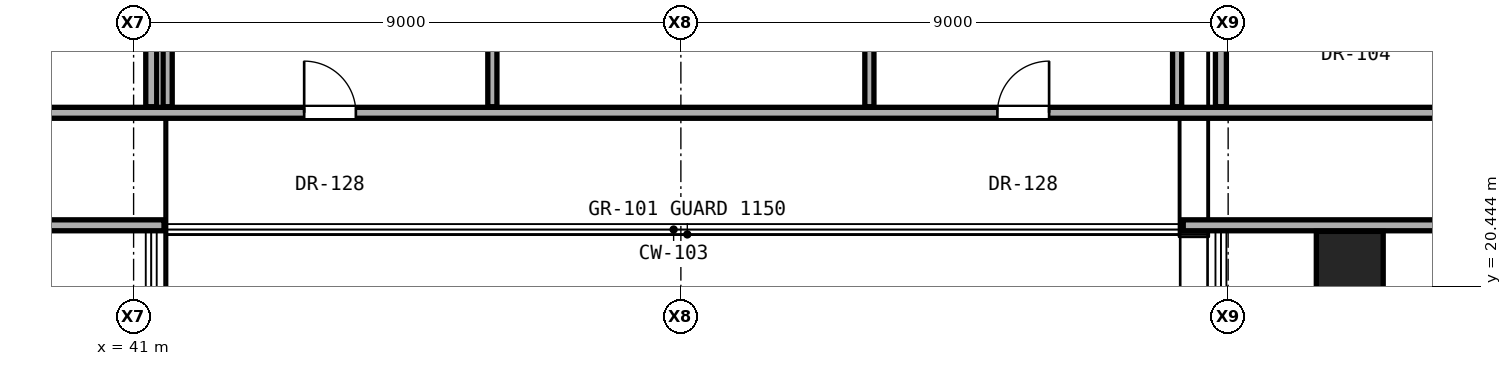
"""IFC4 building model, lengths in metres.
Left out: names, types, materials, properties, quantities, classifications, styles, units other than length and angle.
Written with IfcOpenShell. Run it as: python <this file> out.ifc"""

import sys

from ifc_helpers import new_model, si_unit, direction, frame, frame_2d, origin, origin_2d, place, context, subcontext, project, spatial, rectangle, hollow_rectangle, extrude, element, fill, save


model = new_model("IFC4")
c1 = context("Model", 3, precision=1e-05, world=origin(), true_north=direction((0.0, 1.0)))
c2 = subcontext(c1, "Body", "Model", "MODEL_VIEW")
j1 = project(units=[si_unit("LENGTHUNIT", "METRE"), si_unit("PLANEANGLEUNIT", "RADIAN")], contexts=[c1])
p1 = place(None, origin())
s1 = spatial("IfcSite", under=j1, at=p1, CompositionType="ELEMENT")
p2 = place(p1, origin())
s2 = spatial("IfcBuilding", under=s1, at=p2, CompositionType="ELEMENT")
p3 = place(p2, frame((0.0, 0.0, 95.0)))
s3 = spatial("IfcBuildingStorey", under=s2, at=p3, CompositionType="ELEMENT", Elevation=95.0)
p4 = place(p3, frame((61.0, 20.8, 0.0), z_axis=(0.0, 0.0, 1.0), x_axis=(1.0, 0.0, 0.0)))
e1 = element("IfcColumn", 1, at=p4, inside=s3, PredefinedType="COLUMN", context=c2, shape_type="SweptSolid", body=[
    extrude(hollow_rectangle(XDim=1.1, YDim=1.1, WallThickness=0.06, at=origin_2d()), origin(), (0.0, 0.0, 1.0), 3.3),
])
p5 = place(p3, frame((32.1, 21.45, 0.0), z_axis=(0.0, 0.0, 1.0), x_axis=(1.0, 0.0, 0.0)))
e2 = element("IfcWall", 2, at=p5, inside=s3, PredefinedType="PARTITIONING", context=c2, shape_type="SweptSolid", body=[
    extrude(rectangle(XDim=9.4, YDim=0.18, at=frame_2d((4.7, 0.0))), origin(), (0.0, 0.0, 1.0), 2.105),
])
p6 = place(p3, frame((58.261, 21.45, 0.0), z_axis=(0.0, 0.0, 1.0), x_axis=(1.0, 0.0, 0.0)))
e3 = element("IfcWall", 3, at=p6, inside=s3, PredefinedType="PARTITIONING", context=c2, shape_type="SweptSolid", body=[
    extrude(rectangle(XDim=7.059, YDim=0.18, at=frame_2d((3.529, 0.0))), origin(), (0.0, 0.0, 1.0), 2.105),
])
p7 = place(p6, frame((4.628, 0.0, 0.0)))
e4 = element("IfcOpeningElement", 4, at=p7, cuts=e3, PredefinedType="OPENING", context=c2, shape_type="SweptSolid", body=[
    extrude(rectangle(XDim=0.85, YDim=2.01, at=frame_2d((0.425, 1.005))), frame((0.0, 0.1, 0.0), z_axis=(0.0, -1.0, 0.0), x_axis=(1.0, 0.0, 0.0)), (0.0, 0.0, 1.0), 0.2),
])
p8 = place(p3, frame((32.1, 23.3, 0.0), z_axis=(0.0, 0.0, 1.0), x_axis=(1.0, 0.0, 0.0)))
e5 = element("IfcWall", 5, at=p8, inside=s3, PredefinedType="PARTITIONING", context=c2, shape_type="SweptSolid", body=[
    extrude(rectangle(XDim=33.22, YDim=0.18, at=frame_2d((16.61, 0.0))), origin(), (0.0, 0.0, 1.0), 2.145),
])
p9 = place(p8, frame((11.705, 0.0, 0.0)))
e6 = element("IfcOpeningElement", 6, at=p9, cuts=e5, PredefinedType="OPENING", context=c2, shape_type="SweptSolid", body=[
    extrude(rectangle(XDim=0.85, YDim=2.01, at=frame_2d((0.425, 1.005))), frame((0.0, 0.1, 0.0), z_axis=(0.0, -1.0, 0.0), x_axis=(1.0, 0.0, 0.0)), (0.0, 0.0, 1.0), 0.2),
])
p10 = place(p8, frame((23.105, 0.0, 0.0)))
e7 = element("IfcOpeningElement", 7, at=p10, cuts=e5, PredefinedType="OPENING", context=c2, shape_type="SweptSolid", body=[
    extrude(rectangle(XDim=0.85, YDim=2.01, at=frame_2d((0.425, 1.005))), frame((0.0, 0.1, 0.0), z_axis=(0.0, -1.0, 0.0), x_axis=(1.0, 0.0, 0.0)), (0.0, 0.0, 1.0), 0.2),
])
p11 = place(p3, frame((41.29, 23.4, 0.0), z_axis=(0.0, 0.0, 1.0), x_axis=(0.0, 1.0, 0.0)))
e8 = element("IfcWall", 8, at=p11, inside=s3, PredefinedType="PARTITIONING", context=c2, shape_type="SweptSolid", body=[
    extrude(rectangle(XDim=5.4, YDim=0.18, at=frame_2d((2.7, 0.0))), origin(), (0.0, 0.0, 1.0), 2.105),
])
for number, where, z_axis, x_axis in (
    (9, (41.56, 23.4, 0.0), (0.0, 0.0, 1.0), (0.0, 1.0, 0.0)),
    (10, (46.9, 23.4, 0.0), (0.0, 0.0, 1.0), (0.0, 1.0, 0.0)),
    (11, (53.1, 23.4, 0.0), (0.0, 0.0, 1.0), (0.0, 1.0, 0.0)),
    (12, (58.161, 23.4, 0.0), (0.0, 0.0, 1.0), (0.0, 1.0, 0.0)),
):
    element("IfcWall", number, at=place(p3, frame(where, z_axis=z_axis, x_axis=x_axis)), inside=s3, PredefinedType="PARTITIONING", context=c2, shape_type="SweptSolid", body=[
        extrude(rectangle(XDim=9.065, YDim=0.15, at=frame_2d((4.533, 0.0))), origin(), (0.0, 0.0, 1.0), 2.105),
    ])
p12 = place(p3, frame((58.881, 23.4, 0.0), z_axis=(0.0, 0.0, 1.0), x_axis=(0.0, 1.0, 0.0)))
e13 = element("IfcWall", 13, at=p12, inside=s3, PredefinedType="PARTITIONING", context=c2, shape_type="SweptSolid", body=[
    extrude(rectangle(XDim=1.924, YDim=0.18, at=frame_2d((0.962, 0.0))), origin(), (0.0, 0.0, 1.0), 3.08),
])
p13 = place(p9, origin())
e14 = element("IfcDoor", 14, at=p13, inside=s3, OperationType="SINGLE_SWING_LEFT", PredefinedType="DOOR", context=c2, shape_type="SweptSolid", body=[
    extrude(rectangle(XDim=0.85, YDim=2.01, at=frame_2d((0.425, 1.005))), frame((0.0, 0.025, 0.0), z_axis=(0.0, -1.0, 0.0), x_axis=(1.0, 0.0, 0.0)), (0.0, 0.0, 1.0), 0.05),
])
fill(e6, e14)
p14 = place(p10, origin())
e15 = element("IfcDoor", 15, at=p14, inside=s3, OperationType="SINGLE_SWING_RIGHT", PredefinedType="DOOR", context=c2, shape_type="SweptSolid", body=[
    extrude(rectangle(XDim=0.85, YDim=2.01, at=frame_2d((0.425, 1.005))), frame((0.0, 0.025, 0.0), z_axis=(0.0, -1.0, 0.0), x_axis=(1.0, 0.0, 0.0)), (0.0, 0.0, 1.0), 0.05),
])
fill(e7, e15)
save(model, sys.argv[1])
